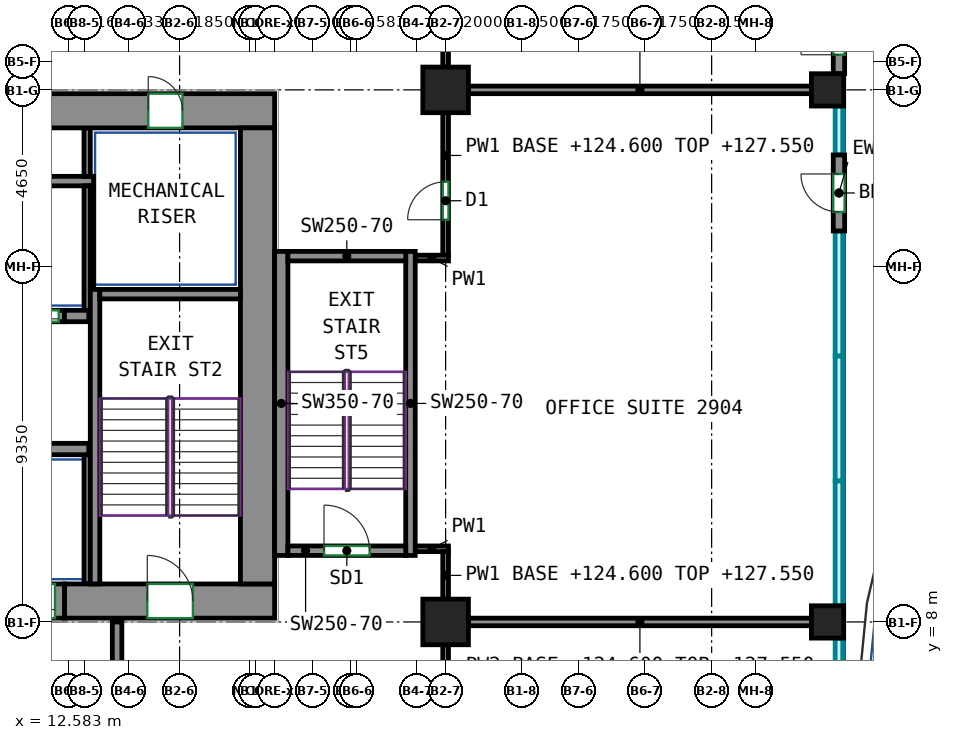
"""IFC4 building model, lengths in metres.
Left out: names, types, materials, properties, quantities, classifications, styles, units other than length and angle.
Written with IfcOpenShell. Run it as: python <this file> out.ifc"""

import sys

from ifc_helpers import new_model, si_unit, direction, frame, frame_2d, origin, origin_2d, place, context, subcontext, project, spatial, rectangle, extrude, source, transform, mapped, element, fill, save


model = new_model("IFC4")
c1 = context("Model", 3, precision=1e-05, world=origin(), true_north=direction((0.0, 1.0)))
c2 = subcontext(c1, "Body", "Model", "MODEL_VIEW")
j1 = project(units=[si_unit("LENGTHUNIT", "METRE"), si_unit("PLANEANGLEUNIT", "RADIAN")], contexts=[c1])
p1 = place(None, origin())
s1 = spatial("IfcSite", under=j1, at=p1, CompositionType="ELEMENT")
p2 = place(p1, origin())
s2 = spatial("IfcBuilding", under=s1, at=p2, CompositionType="ELEMENT")
p3 = place(p2, frame((0.0, 0.0, 124.6)))
s3 = spatial("IfcBuildingStorey", under=s2, at=p3, CompositionType="ELEMENT", Elevation=124.6)
m1 = source(origin(), c2, "Body", "SweptSolid", [
    extrude(rectangle(XDim=1.2, YDim=1.2, at=origin_2d()), origin(), (0.0, 0.0, 1.0), 3.6),
])
for number, where, z_axis, x_axis in (
    (1, (22.5, 8.0, 0.0), (0.0, 0.0, 1.0), (1.0, 0.0, 0.0)),
    (2, (22.5, 22.0, 0.0), (0.0, 0.0, 1.0), (1.0, 0.0, 0.0)),
):
    element("IfcColumn", number, at=place(p3, frame(where, z_axis=z_axis, x_axis=x_axis)), inside=s3, PredefinedType="COLUMN", context=c2, shape_type="MappedRepresentation", body=[
        mapped(m1, transform((0.0, 0.0, 0.0))),
    ])
m2 = source(origin(), c2, "Body", "SweptSolid", [
    extrude(rectangle(XDim=0.85, YDim=0.85, at=origin_2d()), origin(), (0.0, 0.0, 1.0), 3.6),
])
for number, where, z_axis, x_axis in (
    (3, (32.55, 8.0, 0.0), (0.0, 0.0, 1.0), (1.0, 0.0, 0.0)),
    (4, (32.55, 22.0, 0.0), (0.0, 0.0, 1.0), (1.0, 0.0, 0.0)),
):
    element("IfcColumn", number, at=place(p3, frame(where, z_axis=z_axis, x_axis=x_axis)), inside=s3, PredefinedType="COLUMN", context=c2, shape_type="MappedRepresentation", body=[
        mapped(m2, transform((0.0, 0.0, 0.0))),
    ])
m3 = source(origin(), c2, "Body", "SweptSolid", [
    extrude(rectangle(XDim=5.53, YDim=0.9, at=frame_2d((2.765, 0.0))), origin(), (0.0, 0.0, 1.0), 3.6),
])
p4 = place(p3, frame((12.47, 8.55, 0.0), z_axis=(0.0, 0.0, 1.0), x_axis=(1.0, 0.0, 0.0)))
e5 = element("IfcWall", 5, at=p4, inside=s3, PredefinedType="SHEAR", context=c2, shape_type="MappedRepresentation", body=[
    mapped(m3, transform((0.0, 0.0, 0.0))),
])
p5 = place(p4, frame((2.18, 0.0, 0.0)))
e6 = element("IfcOpeningElement", 6, at=p5, cuts=e5, PredefinedType="OPENING", context=c2, shape_type="SweptSolid", body=[
    extrude(rectangle(XDim=1.2, YDim=2.1, at=frame_2d((0.6, 1.05))), frame((0.0, 0.46, 0.0), z_axis=(0.0, -1.0, 0.0), x_axis=(1.0, 0.0, 0.0)), (0.0, 0.0, 1.0), 0.92),
])
m4 = source(origin(), c2, "Body", "SweptSolid", [
    extrude(rectangle(XDim=33.9, YDim=0.9, at=frame_2d((16.95, 0.0))), origin(), (0.0, 0.0, 1.0), 3.6),
])
p6 = place(p3, frame((-15.9, 21.45, 0.0), z_axis=(0.0, 0.0, 1.0), x_axis=(1.0, 0.0, 0.0)))
e7 = element("IfcWall", 7, at=p6, inside=s3, PredefinedType="SHEAR", context=c2, shape_type="MappedRepresentation", body=[
    mapped(m4, transform((0.0, 0.0, 0.0))),
])
p7 = place(p6, frame((6.008, 0.0, 0.0)))
e8 = element("IfcOpeningElement", 8, at=p7, cuts=e7, PredefinedType="OPENING", context=c2, shape_type="SweptSolid", body=[
    extrude(rectangle(XDim=0.9, YDim=2.1, at=frame_2d((0.45, 1.05))), frame((0.0, 0.46, 0.0), z_axis=(0.0, -1.0, 0.0), x_axis=(1.0, 0.0, 0.0)), (0.0, 0.0, 1.0), 0.92),
])
p8 = place(p6, frame((8.688, 0.0, 0.0)))
e9 = element("IfcOpeningElement", 9, at=p8, cuts=e7, PredefinedType="OPENING", context=c2, shape_type="SweptSolid", body=[
    extrude(rectangle(XDim=0.9, YDim=2.1, at=frame_2d((0.45, 1.05))), frame((0.0, 0.46, 0.0), z_axis=(0.0, -1.0, 0.0), x_axis=(1.0, 0.0, 0.0)), (0.0, 0.0, 1.0), 0.92),
])
p9 = place(p6, frame((12.185, 0.0, 0.0)))
e10 = element("IfcOpeningElement", 10, at=p9, cuts=e7, PredefinedType="OPENING", context=c2, shape_type="SweptSolid", body=[
    extrude(rectangle(XDim=0.9, YDim=2.1, at=frame_2d((0.45, 1.05))), frame((0.0, 0.46, 0.0), z_axis=(0.0, -1.0, 0.0), x_axis=(1.0, 0.0, 0.0)), (0.0, 0.0, 1.0), 0.92),
])
p10 = place(p6, frame((16.138, 0.0, 0.0)))
e11 = element("IfcOpeningElement", 11, at=p10, cuts=e7, PredefinedType="OPENING", context=c2, shape_type="SweptSolid", body=[
    extrude(rectangle(XDim=0.9, YDim=2.1, at=frame_2d((0.45, 1.05))), frame((0.0, 0.46, 0.0), z_axis=(0.0, -1.0, 0.0), x_axis=(1.0, 0.0, 0.0)), (0.0, 0.0, 1.0), 0.92),
])
p11 = place(p6, frame((20.962, 0.0, 0.0)))
e12 = element("IfcOpeningElement", 12, at=p11, cuts=e7, PredefinedType="OPENING", context=c2, shape_type="SweptSolid", body=[
    extrude(rectangle(XDim=0.9, YDim=2.1, at=frame_2d((0.45, 1.05))), frame((0.0, 0.46, 0.0), z_axis=(0.0, -1.0, 0.0), x_axis=(1.0, 0.0, 0.0)), (0.0, 0.0, 1.0), 0.92),
])
p12 = place(p6, frame((26.389, 0.0, 0.0)))
e13 = element("IfcOpeningElement", 13, at=p12, cuts=e7, PredefinedType="OPENING", context=c2, shape_type="SweptSolid", body=[
    extrude(rectangle(XDim=0.9, YDim=2.1, at=frame_2d((0.45, 1.05))), frame((0.0, 0.46, 0.0), z_axis=(0.0, -1.0, 0.0), x_axis=(1.0, 0.0, 0.0)), (0.0, 0.0, 1.0), 0.92),
])
p13 = place(p6, frame((2.425, 0.0, 0.0)))
e14 = element("IfcOpeningElement", 14, at=p13, cuts=e7, PredefinedType="OPENING", context=c2, shape_type="SweptSolid", body=[
    extrude(rectangle(XDim=0.9, YDim=2.1, at=frame_2d((0.45, 1.05))), frame((0.0, 0.46, 0.0), z_axis=(0.0, -1.0, 0.0), x_axis=(1.0, 0.0, 0.0)), (0.0, 0.0, 1.0), 0.92),
])
p14 = place(p6, frame((30.575, 0.0, 0.0)))
e15 = element("IfcOpeningElement", 15, at=p14, cuts=e7, PredefinedType="OPENING", context=c2, shape_type="SweptSolid", body=[
    extrude(rectangle(XDim=0.9, YDim=2.1, at=frame_2d((0.45, 1.05))), frame((0.0, 0.46, 0.0), z_axis=(0.0, -1.0, 0.0), x_axis=(1.0, 0.0, 0.0)), (0.0, 0.0, 1.0), 0.92),
])
m5 = source(origin(), c2, "Body", "SweptSolid", [
    extrude(rectangle(XDim=12.0, YDim=0.9, at=frame_2d((6.0, 0.0))), origin(), (0.0, 0.0, 1.0), 3.6),
])
p15 = place(p3, frame((17.55, 9.0, 0.0), z_axis=(0.0, 0.0, 1.0), x_axis=(0.0, 1.0, 0.0)))
e16 = element("IfcWall", 16, at=p15, inside=s3, PredefinedType="SHEAR", context=c2, shape_type="MappedRepresentation", body=[
    mapped(m5, transform((0.0, 0.0, 0.0))),
])
m6 = source(origin(), c2, "Body", "SweptSolid", [
    extrude(rectangle(XDim=7.75, YDim=0.25, at=frame_2d((3.875, 0.0))), origin(), (0.0, 0.0, 1.0), 3.6),
])
p16 = place(p3, frame((13.275, 9.0, 0.0), z_axis=(0.0, 0.0, 1.0), x_axis=(0.0, 1.0, 0.0)))
e17 = element("IfcWall", 17, at=p16, inside=s3, PredefinedType="SHEAR", context=c2, shape_type="MappedRepresentation", body=[
    mapped(m6, transform((0.0, 0.0, 0.0))),
])
m7 = source(origin(), c2, "Body", "SweptSolid", [
    extrude(rectangle(XDim=3.7, YDim=0.25, at=frame_2d((1.85, 0.0))), origin(), (0.0, 0.0, 1.0), 3.6),
])
p17 = place(p3, frame((13.4, 16.625, 0.0), z_axis=(0.0, 0.0, 1.0), x_axis=(1.0, 0.0, 0.0)))
e18 = element("IfcWall", 18, at=p17, inside=s3, PredefinedType="SHEAR", context=c2, shape_type="MappedRepresentation", body=[
    mapped(m7, transform((0.0, 0.0, 0.0))),
])
m8 = source(origin(), c2, "Body", "SweptSolid", [
    extrude(rectangle(XDim=8.0, YDim=0.35, at=frame_2d((4.0, 0.0))), origin(), (0.0, 0.0, 1.0), 3.6),
])
p18 = place(p3, frame((18.175, 9.75, 0.0), z_axis=(0.0, 0.0, 1.0), x_axis=(0.0, 1.0, 0.0)))
e19 = element("IfcWall", 19, at=p18, inside=s3, PredefinedType="SHEAR", context=c2, shape_type="MappedRepresentation", body=[
    mapped(m8, transform((0.0, 0.0, 0.0))),
])
m9 = source(origin(), c2, "Body", "SweptSolid", [
    extrude(rectangle(XDim=8.0, YDim=0.25, at=frame_2d((4.0, 0.0))), origin(), (0.0, 0.0, 1.0), 3.6),
])
p19 = place(p3, frame((21.575, 9.75, 0.0), z_axis=(0.0, 0.0, 1.0), x_axis=(0.0, 1.0, 0.0)))
e20 = element("IfcWall", 20, at=p19, inside=s3, PredefinedType="SHEAR", context=c2, shape_type="MappedRepresentation", body=[
    mapped(m9, transform((0.0, 0.0, 0.0))),
])
m10 = source(origin(), c2, "Body", "SweptSolid", [
    extrude(rectangle(XDim=3.1, YDim=0.25, at=frame_2d((1.55, 0.0))), origin(), (0.0, 0.0, 1.0), 3.6),
])
p20 = place(p3, frame((18.35, 9.875, 0.0), z_axis=(0.0, 0.0, 1.0), x_axis=(1.0, 0.0, 0.0)))
e21 = element("IfcWall", 21, at=p20, inside=s3, PredefinedType="SHEAR", context=c2, shape_type="MappedRepresentation", body=[
    mapped(m10, transform((0.0, 0.0, 0.0))),
])
p21 = place(p20, frame((0.95, 0.0, 0.0)))
e22 = element("IfcOpeningElement", 22, at=p21, cuts=e21, PredefinedType="OPENING", context=c2, shape_type="SweptSolid", body=[
    extrude(rectangle(XDim=1.2, YDim=2.1, at=frame_2d((0.6, 1.05))), frame((0.0, 0.135, 0.0), z_axis=(0.0, -1.0, 0.0), x_axis=(1.0, 0.0, 0.0)), (0.0, 0.0, 1.0), 0.27),
])
p22 = place(p3, frame((18.35, 17.625, 0.0), z_axis=(0.0, 0.0, 1.0), x_axis=(1.0, 0.0, 0.0)))
e23 = element("IfcWall", 23, at=p22, inside=s3, PredefinedType="SHEAR", context=c2, shape_type="MappedRepresentation", body=[
    mapped(m10, transform((0.0, 0.0, 0.0))),
])
m11 = source(origin(), c2, "Body", "SweptSolid", [
    extrude(rectangle(XDim=2.82, YDim=0.3, at=frame_2d((1.41, 0.0))), origin(), (0.0, 0.0, 1.0), 3.6),
])
p23 = place(p3, frame((10.29, 12.55, 0.0), z_axis=(0.0, 0.0, 1.0), x_axis=(1.0, 0.0, 0.0)))
e24 = element("IfcWall", 24, at=p23, inside=s3, PredefinedType="SHEAR", context=c2, shape_type="MappedRepresentation", body=[
    mapped(m11, transform((0.0, 0.0, 0.0))),
])
m12 = source(origin(), c2, "Body", "SweptSolid", [
    extrude(rectangle(XDim=0.64, YDim=0.3, at=frame_2d((0.32, 0.0))), origin(), (0.0, 0.0, 1.0), 3.6),
])
p24 = place(p3, frame((12.47, 16.05, 0.0), z_axis=(0.0, 0.0, 1.0), x_axis=(1.0, 0.0, 0.0)))
e25 = element("IfcWall", 25, at=p24, inside=s3, PredefinedType="SHEAR", context=c2, shape_type="MappedRepresentation", body=[
    mapped(m12, transform((0.0, 0.0, 0.0))),
])
m13 = source(origin(), c2, "Body", "SweptSolid", [
    extrude(rectangle(XDim=2.0, YDim=0.3, at=frame_2d((1.0, 0.0))), origin(), (0.0, 0.0, 1.0), 3.6),
])
p25 = place(p3, frame((32.85, 18.288, 0.0), z_axis=(0.0, 0.0, 1.0), x_axis=(0.0, 1.0, 0.0)))
e26 = element("IfcWall", 26, at=p25, inside=s3, PredefinedType="SOLIDWALL", context=c2, shape_type="MappedRepresentation", body=[
    mapped(m13, transform((0.0, 0.0, 0.0))),
])
p26 = place(p25, frame((0.5, 0.0, 0.0)))
e27 = element("IfcOpeningElement", 27, at=p26, cuts=e26, PredefinedType="OPENING", context=c2, shape_type="SweptSolid", body=[
    extrude(rectangle(XDim=1.0, YDim=2.1, at=frame_2d((0.5, 1.05))), frame((0.0, 0.16, 0.0), z_axis=(0.0, -1.0, 0.0), x_axis=(1.0, 0.0, 0.0)), (0.0, 0.0, 1.0), 0.32),
])
p27 = place(p3, frame((32.85, 22.425, 0.0), z_axis=(0.0, 0.0, 1.0), x_axis=(0.0, 1.0, 0.0)))
e28 = element("IfcWall", 28, at=p27, inside=s3, PredefinedType="SOLIDWALL", context=c2, shape_type="MappedRepresentation", body=[
    mapped(m13, transform((0.0, 0.0, 0.0))),
])
p28 = place(p27, frame((0.5, 0.0, 0.0)))
e29 = element("IfcOpeningElement", 29, at=p28, cuts=e28, PredefinedType="OPENING", context=c2, shape_type="SweptSolid", body=[
    extrude(rectangle(XDim=1.0, YDim=2.1, at=frame_2d((0.5, 1.05))), frame((0.0, 0.16, 0.0), z_axis=(0.0, -1.0, 0.0), x_axis=(1.0, 0.0, 0.0)), (0.0, 0.0, 1.0), 0.32),
])
m14 = source(origin(), c2, "Body", "SweptSolid", [
    extrude(rectangle(XDim=1.4, YDim=0.3, at=frame_2d((0.7, 0.0))), origin(), (0.0, 0.0, 1.0), 3.6),
])
p29 = place(p3, frame((11.07, 16.05, 0.0), z_axis=(0.0, 0.0, 1.0), x_axis=(1.0, 0.0, 0.0)))
e30 = element("IfcWall", 30, at=p29, inside=s3, PredefinedType="PARTITIONING", context=c2, shape_type="MappedRepresentation", body=[
    mapped(m14, transform((0.0, 0.0, 0.0))),
])
p30 = place(p29, frame((0.15, 0.0, 0.0)))
e31 = element("IfcOpeningElement", 31, at=p30, cuts=e30, PredefinedType="OPENING", context=c2, shape_type="SweptSolid", body=[
    extrude(rectangle(XDim=1.1, YDim=2.1, at=frame_2d((0.55, 1.05))), frame((0.0, 0.16, 0.0), z_axis=(0.0, -1.0, 0.0), x_axis=(1.0, 0.0, 0.0)), (0.0, 0.0, 1.0), 0.32),
])
m15 = source(origin(), c2, "Body", "SweptSolid", [
    extrude(rectangle(XDim=2.65, YDim=0.25, at=frame_2d((1.325, 0.0))), origin(), (0.0, 0.0, 1.0), 3.6),
])
p31 = place(p3, frame((13.855, 5.35, 0.0), z_axis=(0.0, 0.0, 1.0), x_axis=(0.0, 1.0, 0.0)))
e32 = element("IfcWall", 32, at=p31, inside=s3, PredefinedType="PARTITIONING", context=c2, shape_type="MappedRepresentation", body=[
    mapped(m15, transform((0.0, 0.0, 0.0))),
])
m16 = source(origin(), c2, "Body", "SweptSolid", [
    extrude(rectangle(XDim=19.01, YDim=0.25, at=frame_2d((9.505, 0.0))), origin(), (0.0, 0.0, 1.0), 3.6),
])
p32 = place(p3, frame((-5.775, 19.6, 0.0), z_axis=(0.0, 0.0, 1.0), x_axis=(1.0, 0.0, 0.0)))
e33 = element("IfcWall", 33, at=p32, inside=s3, PredefinedType="PARTITIONING", context=c2, shape_type="MappedRepresentation", body=[
    mapped(m16, transform((0.0, 0.0, 0.0))),
])
m17 = source(origin(), c2, "Body", "SweptSolid", [
    extrude(rectangle(XDim=3.275, YDim=0.165, at=frame_2d((1.638, 0.0))), origin(), (0.0, 0.0, 1.0), 3.6),
])
p33 = place(p3, frame((13.067, 16.2, 0.0), z_axis=(0.0, 0.0, 1.0), x_axis=(0.0, 1.0, 0.0)))
e34 = element("IfcWall", 34, at=p33, inside=s3, PredefinedType="PARTITIONING", context=c2, shape_type="MappedRepresentation", body=[
    mapped(m17, transform((0.0, 0.0, 0.0))),
])
m18 = source(origin(), c2, "Body", "SweptSolid", [
    extrude(rectangle(XDim=1.275, YDim=0.165, at=frame_2d((0.637, 0.0))), origin(), (0.0, 0.0, 1.0), 3.6),
])
p34 = place(p3, frame((13.067, 19.725, 0.0), z_axis=(0.0, 0.0, 1.0), x_axis=(0.0, 1.0, 0.0)))
e35 = element("IfcWall", 35, at=p34, inside=s3, PredefinedType="PARTITIONING", context=c2, shape_type="MappedRepresentation", body=[
    mapped(m18, transform((0.0, 0.0, 0.0))),
])
m19 = source(origin(), c2, "Body", "SweptSolid", [
    extrude(rectangle(XDim=2.725, YDim=0.085, at=frame_2d((1.363, 0.0))), origin(), (0.0, 0.0, 1.0), 3.6),
])
p35 = place(p3, frame((13.192, 16.75, 0.0), z_axis=(0.0, 0.0, 1.0), x_axis=(0.0, 1.0, 0.0)))
e36 = element("IfcWall", 36, at=p35, inside=s3, PredefinedType="PARTITIONING", context=c2, shape_type="MappedRepresentation", body=[
    mapped(m19, transform((0.0, 0.0, 0.0))),
])
m20 = source(origin(), c2, "Body", "SweptSolid", [
    extrude(rectangle(XDim=3.4, YDim=0.165, at=frame_2d((1.7, 0.0))), origin(), (0.0, 0.0, 1.0), 3.6),
])
p36 = place(p3, frame((13.067, 9.0, 0.0), z_axis=(0.0, 0.0, 1.0), x_axis=(0.0, 1.0, 0.0)))
e37 = element("IfcWall", 37, at=p36, inside=s3, PredefinedType="PARTITIONING", context=c2, shape_type="MappedRepresentation", body=[
    mapped(m20, transform((0.0, 0.0, 0.0))),
])
m21 = source(origin(), c2, "Body", "SweptSolid", [
    extrude(rectangle(XDim=1.4, YDim=0.9, at=frame_2d((0.7, 0.0))), origin(), (0.0, 0.0, 1.0), 2.7),
])
p37 = place(p3, frame((11.07, 8.55, 0.0), z_axis=(0.0, 0.0, 1.0), x_axis=(1.0, 0.0, 0.0)))
e38 = element("IfcWall", 38, at=p37, inside=s3, PredefinedType="PARTITIONING", context=c2, shape_type="MappedRepresentation", body=[
    mapped(m21, transform((0.0, 0.0, 0.0))),
])
p38 = place(p37, frame((0.25, 0.0, 0.0)))
e39 = element("IfcOpeningElement", 39, at=p38, cuts=e38, PredefinedType="OPENING", context=c2, shape_type="SweptSolid", body=[
    extrude(rectangle(XDim=0.9, YDim=2.1, at=frame_2d((0.45, 1.05))), frame((0.0, 0.46, 0.0), z_axis=(0.0, -1.0, 0.0), x_axis=(1.0, 0.0, 0.0)), (0.0, 0.0, 1.0), 0.92),
])
p39 = place(p3, frame((22.5, 4.2, 0.0), z_axis=(0.0, 0.0, 1.0), x_axis=(0.0, 1.0, 0.0)))
e40 = element("IfcWall", 40, at=p39, inside=s3, PredefinedType="PARTITIONING", context=c2, shape_type="SweptSolid", body=[
    extrude(rectangle(XDim=3.2, YDim=0.15, at=frame_2d((1.6, 0.0))), origin(), (0.0, 0.0, 1.0), 2.95),
])
p40 = place(p3, frame((22.5, 17.65, 0.0), z_axis=(0.0, 0.0, 1.0), x_axis=(0.0, 1.0, 0.0)))
e41 = element("IfcWall", 41, at=p40, inside=s3, PredefinedType="PARTITIONING", context=c2, shape_type="SweptSolid", body=[
    extrude(rectangle(XDim=3.75, YDim=0.15, at=frame_2d((1.875, 0.0))), origin(), (0.0, 0.0, 1.0), 2.95),
])
p41 = place(p40, frame((0.933, 0.0, 0.0)))
e42 = element("IfcOpeningElement", 42, at=p41, cuts=e41, PredefinedType="OPENING", context=c2, shape_type="SweptSolid", body=[
    extrude(rectangle(XDim=1.0, YDim=2.1, at=frame_2d((0.5, 1.05))), frame((0.0, 0.085, 0.0), z_axis=(0.0, -1.0, 0.0), x_axis=(1.0, 0.0, 0.0)), (0.0, 0.0, 1.0), 0.17),
])
for number, where, z_axis, x_axis in (
    (43, (21.7, 17.575, 0.0), (0.0, 0.0, 1.0), (1.0, 0.0, 0.0)),
    (44, (22.575, 9.925, 0.0), (0.0, 0.0, 1.0), (-1.0, 0.0, 0.0)),
):
    element("IfcWall", number, at=place(p3, frame(where, z_axis=z_axis, x_axis=x_axis)), inside=s3, PredefinedType="PARTITIONING", context=c2, shape_type="SweptSolid", body=[
        extrude(rectangle(XDim=0.875, YDim=0.15, at=frame_2d((0.438, 0.0))), origin(), (0.0, 0.0, 1.0), 3.6),
    ])
p42 = place(p3, frame((22.5, 8.6, 0.0), z_axis=(0.0, 0.0, 1.0), x_axis=(0.0, 1.0, 0.0)))
e45 = element("IfcWall", 45, at=p42, inside=s3, PredefinedType="PARTITIONING", context=c2, shape_type="SweptSolid", body=[
    extrude(rectangle(XDim=1.25, YDim=0.15, at=frame_2d((0.625, 0.0))), origin(), (0.0, 0.0, 1.0), 2.95),
])
p43 = place(p3, frame((22.5, 22.6, 0.0), z_axis=(0.0, 0.0, 1.0), x_axis=(0.0, 1.0, 0.0)))
e46 = element("IfcWall", 46, at=p43, inside=s3, PredefinedType="PARTITIONING", context=c2, shape_type="SweptSolid", body=[
    extrude(rectangle(XDim=1.725, YDim=0.15, at=frame_2d((0.862, 0.0))), origin(), (0.0, 0.0, 1.0), 2.95),
])
for number, where, z_axis, x_axis in (
    (47, (23.1, 8.0, 0.0), (0.0, 0.0, 1.0), (1.0, 0.0, 0.0)),
    (48, (23.1, 22.0, 0.0), (0.0, 0.0, 1.0), (1.0, 0.0, 0.0)),
):
    element("IfcWall", number, at=place(p3, frame(where, z_axis=z_axis, x_axis=x_axis)), inside=s3, PredefinedType="PARTITIONING", context=c2, shape_type="SweptSolid", body=[
        extrude(rectangle(XDim=9.025, YDim=0.2, at=frame_2d((4.512, 0.0))), origin(), (0.0, 0.0, 1.0), 2.95),
    ])
p44 = place(p26, origin())
e49 = element("IfcDoor", 49, at=p44, inside=s3, OperationType="SINGLE_SWING_RIGHT", PredefinedType="DOOR", context=c2, shape_type="SweptSolid", body=[
    extrude(rectangle(XDim=1.0, YDim=2.1, at=frame_2d((0.5, 1.05))), frame((0.0, 0.025, 0.0), z_axis=(0.0, -1.0, 0.0), x_axis=(1.0, 0.0, 0.0)), (0.0, 0.0, 1.0), 0.05),
])
fill(e27, e49)
p45 = place(p28, origin())
e50 = element("IfcDoor", 50, at=p45, inside=s3, OperationType="SINGLE_SWING_LEFT", PredefinedType="DOOR", context=c2, shape_type="SweptSolid", body=[
    extrude(rectangle(XDim=1.0, YDim=2.1, at=frame_2d((0.5, 1.05))), frame((0.0, 0.025, 0.0), z_axis=(0.0, -1.0, 0.0), x_axis=(1.0, 0.0, 0.0)), (0.0, 0.0, 1.0), 0.05),
])
fill(e29, e50)
p46 = place(p38, origin())
e51 = element("IfcDoor", 51, at=p46, inside=s3, OperationType="SLIDING_TO_LEFT", PredefinedType="DOOR", context=c2, shape_type="SweptSolid", body=[
    extrude(rectangle(XDim=0.9, YDim=2.1, at=frame_2d((0.45, 1.05))), frame((0.0, 0.355, 0.0), z_axis=(0.0, -1.0, 0.0), x_axis=(1.0, 0.0, 0.0)), (0.0, 0.0, 1.0), 0.05),
])
fill(e39, e51)
p47 = place(p30, origin())
e52 = element("IfcDoor", 52, at=p47, inside=s3, OperationType="DOUBLE_DOOR_SLIDING", PredefinedType="DOOR", context=c2, shape_type="SweptSolid", body=[
    extrude(rectangle(XDim=1.1, YDim=2.1, at=frame_2d((0.55, 1.05))), frame((0.0, 0.025, 0.0), z_axis=(0.0, -1.0, 0.0), x_axis=(1.0, 0.0, 0.0)), (0.0, 0.0, 1.0), 0.05),
])
fill(e31, e52)
p48 = place(p14, origin())
e53 = element("IfcDoor", 53, at=p48, inside=s3, OperationType="SINGLE_SWING_LEFT", PredefinedType="DOOR", context=c2, shape_type="SweptSolid", body=[
    extrude(rectangle(XDim=0.9, YDim=2.1, at=frame_2d((0.45, 1.05))), frame((0.0, -0.305, 0.0), z_axis=(0.0, -1.0, 0.0), x_axis=(1.0, 0.0, 0.0)), (0.0, 0.0, 1.0), 0.05),
])
fill(e15, e53)
p49 = place(p5, origin())
e54 = element("IfcDoor", 54, at=p49, inside=s3, OperationType="DOUBLE_DOOR_SINGLE_SWING", PredefinedType="DOOR", context=c2, shape_type="SweptSolid", body=[
    extrude(rectangle(XDim=1.2, YDim=2.1, at=frame_2d((0.6, 1.05))), frame((0.0, 0.355, 0.0), z_axis=(0.0, -1.0, 0.0), x_axis=(1.0, 0.0, 0.0)), (0.0, 0.0, 1.0), 0.05),
])
fill(e6, e54)
p50 = place(p21, origin())
e55 = element("IfcDoor", 55, at=p50, inside=s3, OperationType="DOUBLE_DOOR_SINGLE_SWING", PredefinedType="DOOR", context=c2, shape_type="SweptSolid", body=[
    extrude(rectangle(XDim=1.2, YDim=2.1, at=frame_2d((0.6, 1.05))), frame((0.0, 0.025, 0.0), z_axis=(0.0, -1.0, 0.0), x_axis=(1.0, 0.0, 0.0)), (0.0, 0.0, 1.0), 0.05),
])
fill(e22, e55)
p51 = place(p41, origin())
e56 = element("IfcDoor", 56, at=p51, inside=s3, OperationType="SINGLE_SWING_LEFT", PredefinedType="DOOR", context=c2, shape_type="SweptSolid", body=[
    extrude(rectangle(XDim=1.0, YDim=2.1, at=frame_2d((0.5, 1.05))), frame((0.0, 0.025, 0.0), z_axis=(0.0, -1.0, 0.0), x_axis=(1.0, 0.0, 0.0)), (0.0, 0.0, 1.0), 0.05),
])
fill(e42, e56)
save(model, sys.argv[1])
